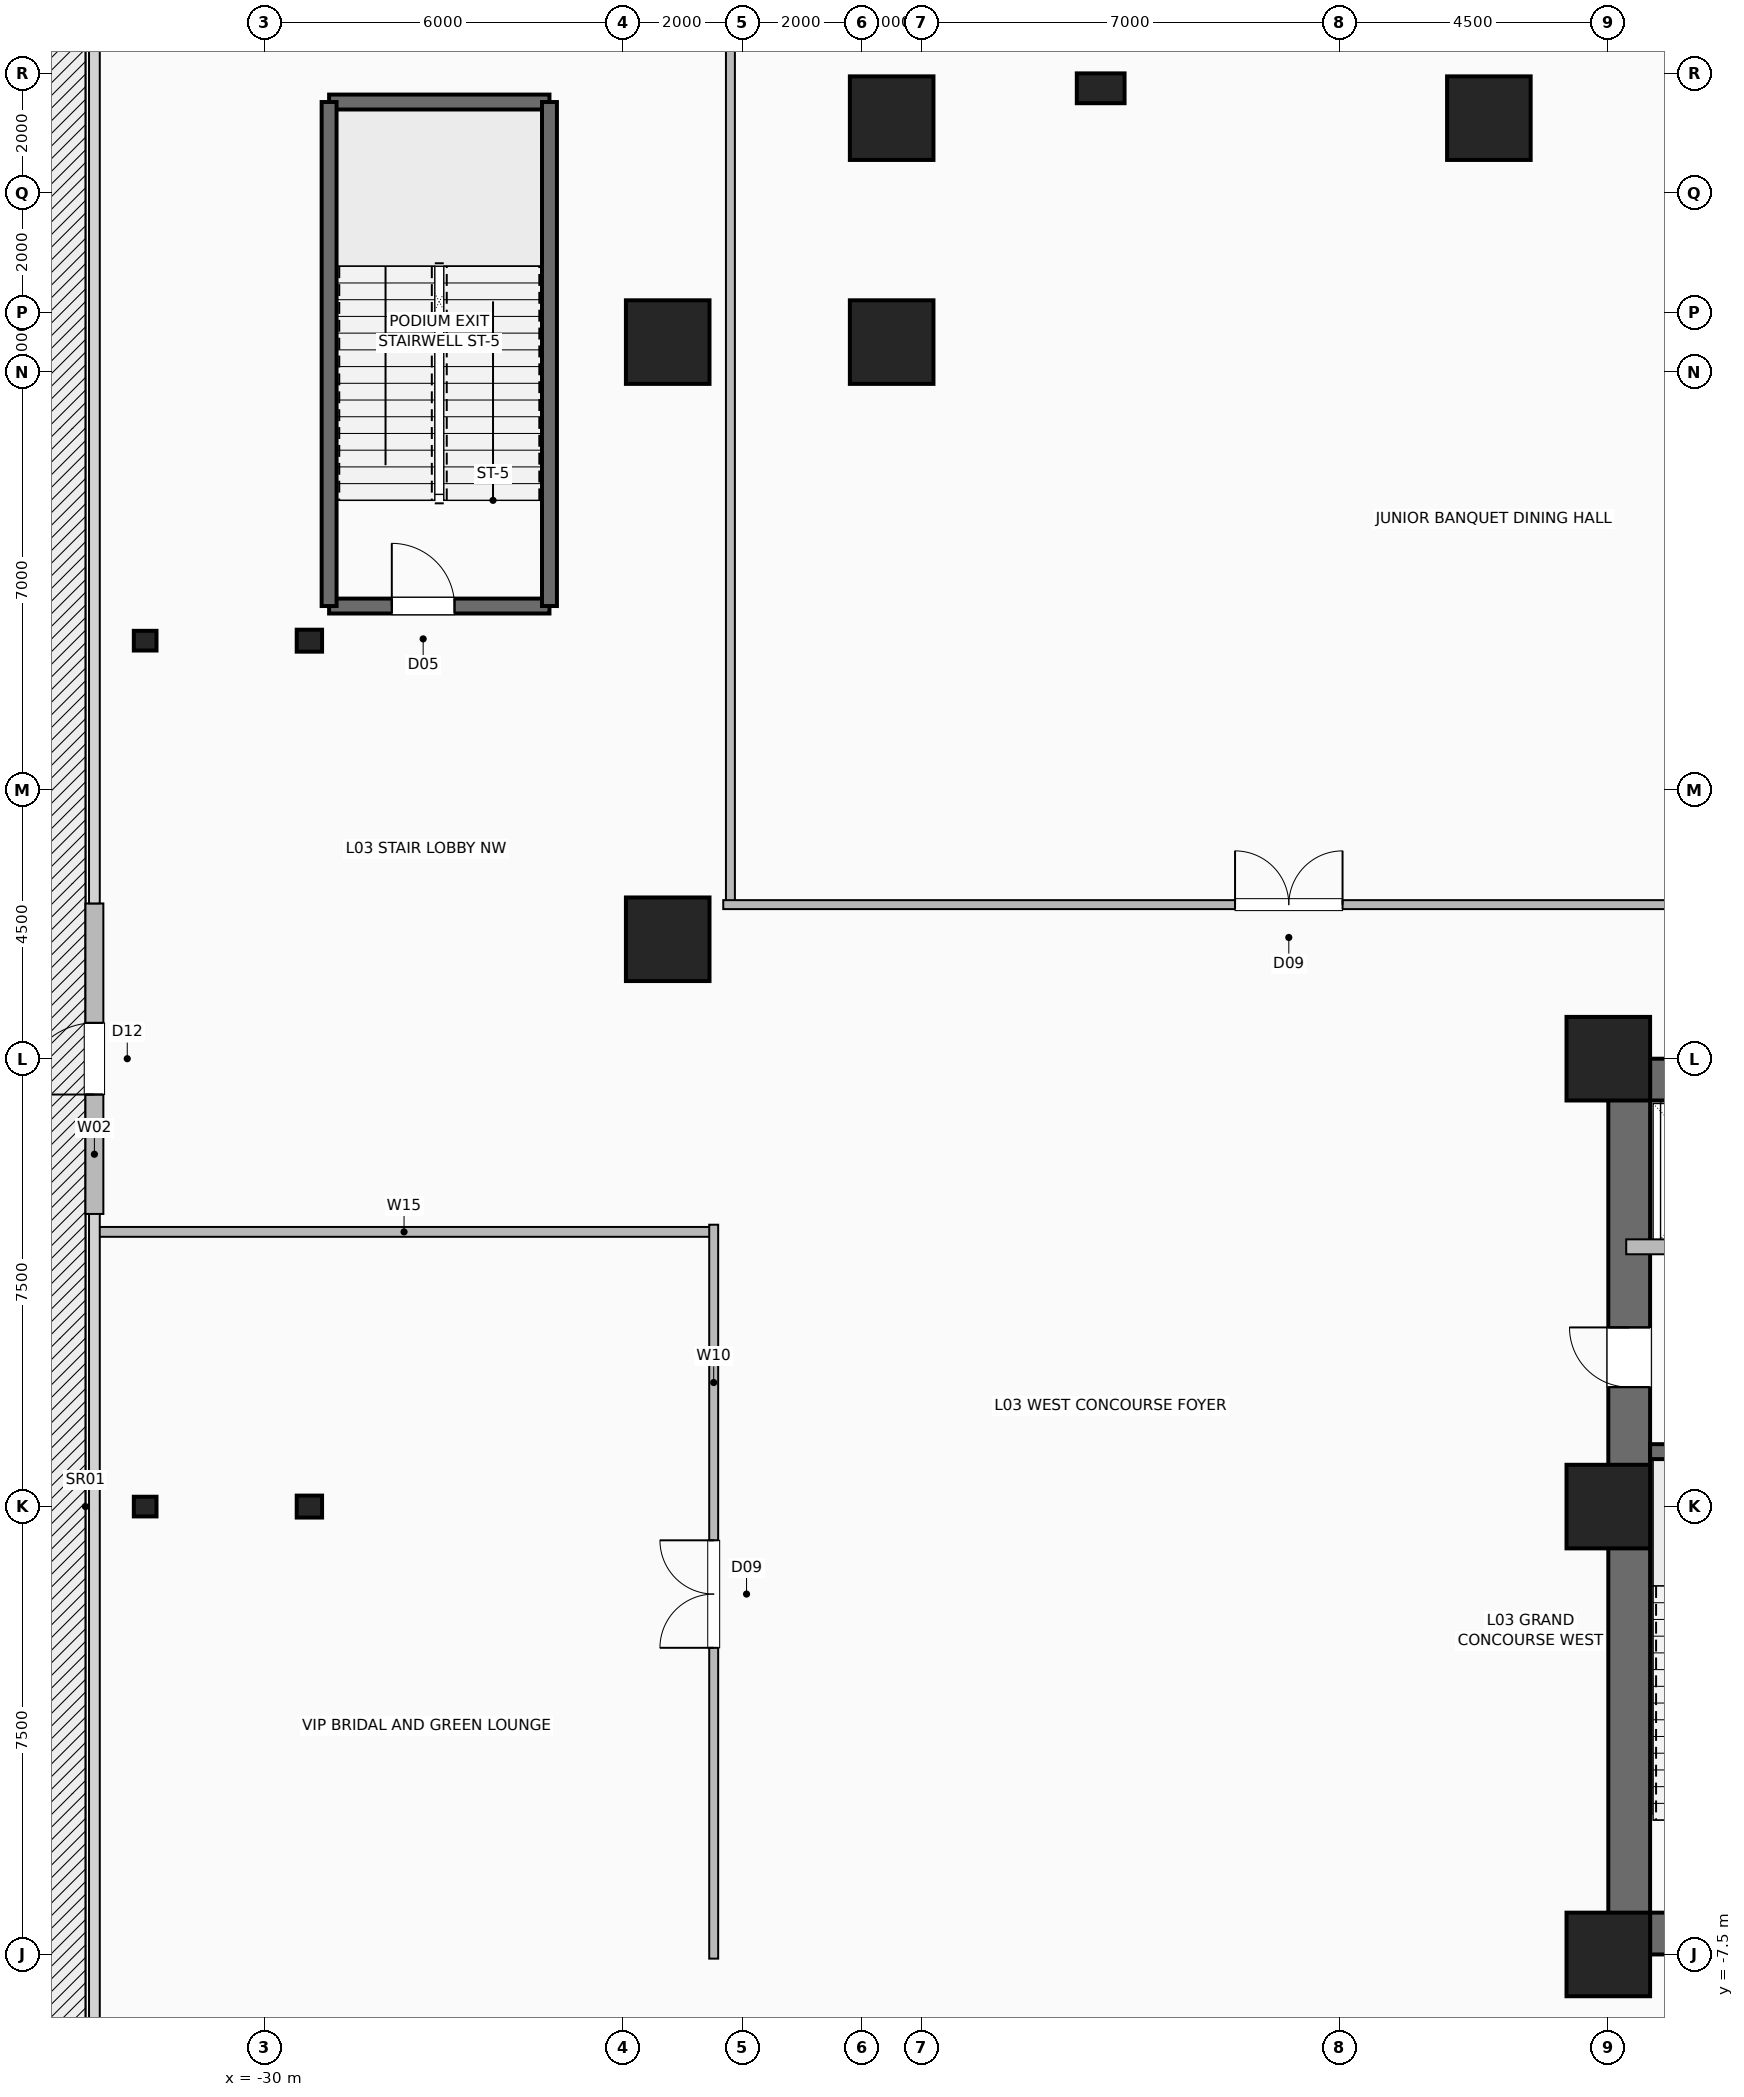
"""IFC4 building model, lengths in metres.
Left out: names, types, materials, properties, quantities, classifications, styles, units other than length and angle.
Written with IfcOpenShell. Run it as: python <this file> out.ifc"""

import sys

from ifc_helpers import new_model, si_unit, direction, frame, frame_2d, origin, origin_2d, place, context, subcontext, project, spatial, rectangle, hollow_rectangle, i_section, extrude, element, fill, save


model = new_model("IFC4")
c1 = context("Model", 3, precision=1e-05, world=origin(), true_north=direction((0.0, 1.0)))
c2 = subcontext(c1, "Body", "Model", "MODEL_VIEW")
j1 = project(units=[si_unit("LENGTHUNIT", "METRE"), si_unit("PLANEANGLEUNIT", "RADIAN")], contexts=[c1])
p1 = place(None, origin())
s1 = spatial("IfcSite", under=j1, at=p1, CompositionType="ELEMENT")
p2 = place(p1, origin())
s2 = spatial("IfcBuilding", under=s1, at=p2, CompositionType="ELEMENT")
p3 = place(p2, frame((0.0, 0.0, 16.2)))
s3 = spatial("IfcBuildingStorey", under=s2, at=p3, CompositionType="ELEMENT", Elevation=16.2)
for number, where, z_axis, x_axis in (
    (1, (-7.5, -7.5, 0.0), (0.0, 0.0, 1.0), (1.0, 0.0, 0.0)),
    (2, (-7.5, 7.5, 0.0), (0.0, 0.0, 1.0), (1.0, 0.0, 0.0)),
    (3, (-7.5, 0.0, 0.0), (0.0, 0.0, 1.0), (1.0, 0.0, 0.0)),
    (4, (-19.5, 23.25, 0.0), (0.0, 0.0, 1.0), (1.0, 0.0, 0.0)),
    (5, (-9.5, 23.25, 0.0), (0.0, 0.0, 1.0), (1.0, 0.0, 0.0)),
    (6, (-23.25, 9.5, 0.0), (0.0, 0.0, 1.0), (1.0, 0.0, 0.0)),
    (7, (-23.25, 19.5, 0.0), (0.0, 0.0, 1.0), (1.0, 0.0, 0.0)),
    (8, (-19.5, 19.5, 0.0), (0.0, 0.0, 1.0), (1.0, 0.0, 0.0)),
):
    element("IfcColumn", number, at=place(p3, frame(where, z_axis=z_axis, x_axis=x_axis)), inside=s3, PredefinedType="COLUMN", context=c2, shape_type="SweptSolid", body=[
        extrude(hollow_rectangle(XDim=1.4, YDim=1.4, WallThickness=0.06, at=origin_2d()), origin(), (0.0, 0.0, 1.0), 5.4),
    ])
for number, where, z_axis, x_axis in (
    (9, (-29.25, 0.0, 0.0), (0.0, 0.0, 1.0), (1.0, 0.0, 0.0)),
    (10, (-29.25, 14.5, 0.0), (0.0, 0.0, 1.0), (1.0, 0.0, 0.0)),
):
    element("IfcColumn", number, at=place(p3, frame(where, z_axis=z_axis, x_axis=x_axis)), inside=s3, PredefinedType="COLUMN", context=c2, shape_type="SweptSolid", body=[
        extrude(i_section(OverallWidth=0.368, OverallDepth=0.425, WebThickness=0.03, FlangeThickness=0.048, FilletRadius=0.02, at=origin_2d()), origin(), (0.0, 0.0, 1.0), 5.4),
    ])
for number, where, z_axis, x_axis in (
    (11, (-32.0, 0.0, -0.4), (0.0, 0.0, 1.0), (1.0, 0.0, 0.0)),
    (12, (-32.0, 14.5, -0.4), (0.0, 0.0, 1.0), (1.0, 0.0, 0.0)),
):
    element("IfcColumn", number, at=place(p3, frame(where, z_axis=z_axis, x_axis=x_axis)), inside=s3, PredefinedType="COLUMN", context=c2, shape_type="SweptSolid", body=[
        extrude(i_section(OverallWidth=0.33, OverallDepth=0.38, WebThickness=0.017, FlangeThickness=0.028, FilletRadius=0.02, at=origin_2d()), origin(), (0.0, 0.0, 1.0), 5.4),
    ])
p4 = place(p3, frame((-16.0, 23.75, 0.0), z_axis=(0.0, 0.0, 1.0), x_axis=(1.0, 0.0, 0.0)))
e13 = element("IfcColumn", 13, at=p4, inside=s3, PredefinedType="PILASTER", context=c2, shape_type="SweptSolid", body=[
    extrude(rectangle(XDim=0.5, YDim=0.8, at=origin_2d()), origin(), (0.0, 0.0, 1.0), 5.4),
])
p5 = place(p3, frame((-32.85, 4.9, 0.0), z_axis=(0.0, 0.0, 1.0), x_axis=(0.0, 1.0, 0.0)))
e14 = element("IfcWall", 14, at=p5, inside=s3, PredefinedType="SOLIDWALL", context=c2, shape_type="SweptSolid", body=[
    extrude(rectangle(XDim=5.2, YDim=0.3, at=frame_2d((2.6, 0.0))), origin(), (0.0, 0.0, 1.0), 5.0),
])
p6 = place(p5, frame((2.0, 0.0, 0.0)))
e15 = element("IfcOpeningElement", 15, at=p6, cuts=e14, PredefinedType="OPENING", context=c2, shape_type="SweptSolid", body=[
    extrude(rectangle(XDim=1.2, YDim=2.25, at=frame_2d((0.6, 1.125))), frame((0.0, 0.16, 0.0), z_axis=(0.0, -1.0, 0.0), x_axis=(1.0, 0.0, 0.0)), (0.0, 0.0, 1.0), 0.32),
])
p7 = place(p3, frame((-7.5, -7.15, 0.0), z_axis=(0.0, 0.0, 1.0), x_axis=(1.0, 0.0, 0.0)))
e16 = element("IfcWall", 16, at=p7, inside=s3, PredefinedType="SHEAR", context=c2, shape_type="SweptSolid", body=[
    extrude(rectangle(XDim=15.0, YDim=0.7, at=frame_2d((7.5, 0.0))), origin(), (0.0, 0.0, 1.0), 5.0),
])
p8 = place(p7, frame((1.55, 0.0, 0.0)))
e17 = element("IfcOpeningElement", 17, at=p8, cuts=e16, PredefinedType="OPENING", context=c2, shape_type="SweptSolid", body=[
    extrude(rectangle(XDim=1.05, YDim=2.08, at=frame_2d((0.525, 1.04))), frame((0.0, 0.36, 0.0), z_axis=(0.0, -1.0, 0.0), x_axis=(1.0, 0.0, 0.0)), (0.0, 0.0, 1.0), 0.72),
])
p9 = place(p7, frame((12.4, 0.0, 0.0)))
e18 = element("IfcOpeningElement", 18, at=p9, cuts=e16, PredefinedType="OPENING", context=c2, shape_type="SweptSolid", body=[
    extrude(rectangle(XDim=1.05, YDim=2.08, at=frame_2d((0.525, 1.04))), frame((0.0, 0.36, 0.0), z_axis=(0.0, -1.0, 0.0), x_axis=(1.0, 0.0, 0.0)), (0.0, 0.0, 1.0), 0.72),
])
p10 = place(p7, frame((4.64, 0.0, 0.0)))
e19 = element("IfcOpeningElement", 19, at=p10, cuts=e16, PredefinedType="OPENING", context=c2, shape_type="SweptSolid", body=[
    extrude(rectangle(XDim=1.1, YDim=2.2, at=frame_2d((0.55, 1.1))), frame((0.0, 0.36, 0.0), z_axis=(0.0, -1.0, 0.0), x_axis=(1.0, 0.0, 0.0)), (0.0, 0.0, 1.0), 0.72),
])
p11 = place(p7, frame((6.52, 0.0, 0.0)))
e20 = element("IfcOpeningElement", 20, at=p11, cuts=e16, PredefinedType="OPENING", context=c2, shape_type="SweptSolid", body=[
    extrude(rectangle(XDim=1.1, YDim=2.2, at=frame_2d((0.55, 1.1))), frame((0.0, 0.36, 0.0), z_axis=(0.0, -1.0, 0.0), x_axis=(1.0, 0.0, 0.0)), (0.0, 0.0, 1.0), 0.72),
])
p12 = place(p7, frame((8.4, 0.0, 0.0)))
e21 = element("IfcOpeningElement", 21, at=p12, cuts=e16, PredefinedType="OPENING", context=c2, shape_type="SweptSolid", body=[
    extrude(rectangle(XDim=1.1, YDim=2.2, at=frame_2d((0.55, 1.1))), frame((0.0, 0.36, 0.0), z_axis=(0.0, -1.0, 0.0), x_axis=(1.0, 0.0, 0.0)), (0.0, 0.0, 1.0), 0.72),
])
p13 = place(p3, frame((-7.5, 7.15, 0.0), z_axis=(0.0, 0.0, 1.0), x_axis=(1.0, 0.0, 0.0)))
e22 = element("IfcWall", 22, at=p13, inside=s3, PredefinedType="SHEAR", context=c2, shape_type="SweptSolid", body=[
    extrude(rectangle(XDim=15.0, YDim=0.7, at=frame_2d((7.5, 0.0))), origin(), (0.0, 0.0, 1.0), 5.0),
])
p14 = place(p3, frame((-7.15, -7.5, 0.0), z_axis=(0.0, 0.0, 1.0), x_axis=(0.0, 1.0, 0.0)))
e23 = element("IfcWall", 23, at=p14, inside=s3, PredefinedType="SHEAR", context=c2, shape_type="SweptSolid", body=[
    extrude(rectangle(XDim=15.0, YDim=0.7, at=frame_2d((7.5, 0.0))), origin(), (0.0, 0.0, 1.0), 5.0),
])
p15 = place(p14, frame((9.5, 0.0, 0.0)))
e24 = element("IfcOpeningElement", 24, at=p15, cuts=e23, PredefinedType="OPENING", context=c2, shape_type="SweptSolid", body=[
    extrude(rectangle(XDim=1.0, YDim=2.08, at=frame_2d((0.5, 1.04))), frame((0.0, 0.36, 0.0), z_axis=(0.0, -1.0, 0.0), x_axis=(1.0, 0.0, 0.0)), (0.0, 0.0, 1.0), 0.72),
])
p16 = place(p3, frame((-6.8, 0.92, 0.0), z_axis=(0.0, 0.0, 1.0), x_axis=(1.0, 0.0, 0.0)))
e25 = element("IfcWall", 25, at=p16, inside=s3, PredefinedType="SHEAR", context=c2, shape_type="SweptSolid", body=[
    extrude(rectangle(XDim=3.33, YDim=0.25, at=frame_2d((1.665, 0.0))), origin(), (0.0, 0.0, 1.0), 5.0),
])
p17 = place(p3, frame((-7.2, 4.35, 0.0), z_axis=(0.0, 0.0, 1.0), x_axis=(1.0, 0.0, 0.0)))
e26 = element("IfcWall", 26, at=p17, inside=s3, PredefinedType="SHEAR", context=c2, shape_type="SweptSolid", body=[
    extrude(rectangle(XDim=2.7, YDim=0.25, at=frame_2d((1.35, 0.0))), origin(), (0.0, 0.0, 1.0), 5.0),
])
p18 = place(p17, frame((0.75, 0.0, 0.0)))
e27 = element("IfcOpeningElement", 27, at=p18, cuts=e26, PredefinedType="OPENING", context=c2, shape_type="SweptSolid", body=[
    extrude(rectangle(XDim=1.2, YDim=2.2, at=frame_2d((0.6, 1.1))), frame((0.0, 0.135, 0.0), z_axis=(0.0, -1.0, 0.0), x_axis=(1.0, 0.0, 0.0)), (0.0, 0.0, 1.0), 0.27),
])
p19 = place(p3, frame((-28.92, 15.08, 0.0), z_axis=(0.0, 0.0, 1.0), x_axis=(1.0, 0.0, 0.0)))
e28 = element("IfcWall", 28, at=p19, inside=s3, PredefinedType="SHEAR", context=c2, shape_type="SweptSolid", body=[
    extrude(rectangle(XDim=3.69, YDim=0.25, at=frame_2d((1.845, 0.0))), origin(), (0.0, 0.0, 1.0), 5.0),
])
p20 = place(p19, frame((1.05, 0.0, 0.0)))
e29 = element("IfcOpeningElement", 29, at=p20, cuts=e28, PredefinedType="OPENING", context=c2, shape_type="SweptSolid", body=[
    extrude(rectangle(XDim=1.05, YDim=2.08, at=frame_2d((0.525, 1.04))), frame((0.0, 0.135, 0.0), z_axis=(0.0, -1.0, 0.0), x_axis=(1.0, 0.0, 0.0)), (0.0, 0.0, 1.0), 0.27),
])
p21 = place(p3, frame((-28.92, 23.52, 0.0), z_axis=(0.0, 0.0, 1.0), x_axis=(1.0, 0.0, 0.0)))
e30 = element("IfcWall", 30, at=p21, inside=s3, PredefinedType="SHEAR", context=c2, shape_type="SweptSolid", body=[
    extrude(rectangle(XDim=3.69, YDim=0.25, at=frame_2d((1.845, 0.0))), origin(), (0.0, 0.0, 1.0), 5.0),
])
for number, where, z_axis, x_axis in (
    (31, (-28.92, 15.08, 0.0), (0.0, 0.0, 1.0), (0.0, 1.0, 0.0)),
    (32, (-25.23, 15.08, 0.0), (0.0, 0.0, 1.0), (0.0, 1.0, 0.0)),
):
    element("IfcWall", number, at=place(p3, frame(where, z_axis=z_axis, x_axis=x_axis)), inside=s3, PredefinedType="SHEAR", context=c2, shape_type="SweptSolid", body=[
        extrude(rectangle(XDim=8.44, YDim=0.25, at=frame_2d((4.22, 0.0))), origin(), (0.0, 0.0, 1.0), 5.0),
    ])
p22 = place(p3, frame((-22.2, 10.08, 0.0), z_axis=(0.0, 0.0, 1.0), x_axis=(0.0, 1.0, 0.0)))
e33 = element("IfcWall", 33, at=p22, inside=s3, PredefinedType="PARTITIONING", context=c2, shape_type="SweptSolid", body=[
    extrude(rectangle(XDim=15.27, YDim=0.15, at=frame_2d((7.635, 0.0))), origin(), (0.0, 0.0, 1.0), 5.0),
])
p23 = place(p3, frame((-22.32, 10.08, 0.0), z_axis=(0.0, 0.0, 1.0), x_axis=(1.0, 0.0, 0.0)))
e34 = element("IfcWall", 34, at=p23, inside=s3, PredefinedType="PARTITIONING", context=c2, shape_type="SweptSolid", body=[
    extrude(rectangle(XDim=44.64, YDim=0.15, at=frame_2d((22.32, 0.0))), origin(), (0.0, 0.0, 1.0), 5.0),
])
p24 = place(p23, frame((8.57, 0.0, 0.0)))
e35 = element("IfcOpeningElement", 35, at=p24, cuts=e34, PredefinedType="OPENING", context=c2, shape_type="SweptSolid", body=[
    extrude(rectangle(XDim=1.8, YDim=2.08, at=frame_2d((0.9, 1.04))), frame((0.0, 0.085, 0.0), z_axis=(0.0, -1.0, 0.0), x_axis=(1.0, 0.0, 0.0)), (0.0, 0.0, 1.0), 0.17),
])
p25 = place(p23, frame((22.42, 0.0, 0.0)))
e36 = element("IfcOpeningElement", 36, at=p25, cuts=e34, PredefinedType="OPENING", context=c2, shape_type="SweptSolid", body=[
    extrude(rectangle(XDim=1.8, YDim=2.08, at=frame_2d((0.9, 1.04))), frame((0.0, 0.085, 0.0), z_axis=(0.0, -1.0, 0.0), x_axis=(1.0, 0.0, 0.0)), (0.0, 0.0, 1.0), 0.17),
])
p26 = place(p23, frame((35.27, 0.0, 0.0)))
e37 = element("IfcOpeningElement", 37, at=p26, cuts=e34, PredefinedType="OPENING", context=c2, shape_type="SweptSolid", body=[
    extrude(rectangle(XDim=1.8, YDim=2.08, at=frame_2d((0.9, 1.04))), frame((0.0, 0.085, 0.0), z_axis=(0.0, -1.0, 0.0), x_axis=(1.0, 0.0, 0.0)), (0.0, 0.0, 1.0), 0.17),
])
p27 = place(p3, frame((-32.85, 4.6, 0.0), z_axis=(0.0, 0.0, 1.0), x_axis=(1.0, 0.0, 0.0)))
e38 = element("IfcWall", 38, at=p27, inside=s3, PredefinedType="PLUMBINGWALL", context=c2, shape_type="SweptSolid", body=[
    extrude(rectangle(XDim=10.37, YDim=0.165, at=frame_2d((5.185, 0.0))), origin(), (0.0, 0.0, 1.0), 5.0),
])
p28 = place(p3, frame((-22.48, -7.57, 0.0), z_axis=(0.0, 0.0, 1.0), x_axis=(0.0, 1.0, 0.0)))
e39 = element("IfcWall", 39, at=p28, inside=s3, PredefinedType="PARTITIONING", context=c2, shape_type="SweptSolid", body=[
    extrude(rectangle(XDim=12.29, YDim=0.15, at=frame_2d((6.145, 0.0))), origin(), (0.0, 0.0, 1.0), 5.0),
])
p29 = place(p28, frame((5.205, 0.0, 0.0)))
e40 = element("IfcOpeningElement", 40, at=p29, cuts=e39, PredefinedType="OPENING", context=c2, shape_type="SweptSolid", body=[
    extrude(rectangle(XDim=1.8, YDim=2.08, at=frame_2d((0.9, 1.04))), frame((0.0, 0.085, 0.0), z_axis=(0.0, -1.0, 0.0), x_axis=(1.0, 0.0, 0.0)), (0.0, 0.0, 1.0), 0.17),
])
p30 = place(p6, origin())
e41 = element("IfcDoor", 41, at=p30, inside=s3, OperationType="SINGLE_SWING_LEFT", PredefinedType="DOOR", context=c2, shape_type="SweptSolid", body=[
    extrude(rectangle(XDim=1.2, YDim=2.25, at=frame_2d((0.6, 1.125))), frame((0.0, 0.025, 0.0), z_axis=(0.0, -1.0, 0.0), x_axis=(1.0, 0.0, 0.0)), (0.0, 0.0, 1.0), 0.05),
])
fill(e15, e41)
p31 = place(p15, origin())
e42 = element("IfcDoor", 42, at=p31, inside=s3, OperationType="SINGLE_SWING_RIGHT", PredefinedType="DOOR", context=c2, shape_type="SweptSolid", body=[
    extrude(rectangle(XDim=1.0, YDim=2.08, at=frame_2d((0.5, 1.04))), frame((0.0, 0.025, 0.0), z_axis=(0.0, -1.0, 0.0), x_axis=(1.0, 0.0, 0.0)), (0.0, 0.0, 1.0), 0.05),
])
fill(e24, e42)
p32 = place(p20, origin())
e43 = element("IfcDoor", 43, at=p32, inside=s3, OperationType="SINGLE_SWING_LEFT", PredefinedType="DOOR", context=c2, shape_type="SweptSolid", body=[
    extrude(rectangle(XDim=1.05, YDim=2.08, at=frame_2d((0.525, 1.04))), frame((0.0, 0.025, 0.0), z_axis=(0.0, -1.0, 0.0), x_axis=(1.0, 0.0, 0.0)), (0.0, 0.0, 1.0), 0.05),
])
fill(e29, e43)
p33 = place(p24, origin())
e44 = element("IfcDoor", 44, at=p33, inside=s3, OperationType="DOUBLE_DOOR_SINGLE_SWING", PredefinedType="DOOR", context=c2, shape_type="SweptSolid", body=[
    extrude(rectangle(XDim=1.8, YDim=2.08, at=frame_2d((0.9, 1.04))), frame((0.0, 0.025, 0.0), z_axis=(0.0, -1.0, 0.0), x_axis=(1.0, 0.0, 0.0)), (0.0, 0.0, 1.0), 0.05),
])
fill(e35, e44)
p34 = place(p29, origin())
e45 = element("IfcDoor", 45, at=p34, inside=s3, OperationType="DOUBLE_DOOR_SINGLE_SWING", PredefinedType="DOOR", context=c2, shape_type="SweptSolid", body=[
    extrude(rectangle(XDim=1.8, YDim=2.08, at=frame_2d((0.9, 1.04))), frame((0.0, 0.025, 0.0), z_axis=(0.0, -1.0, 0.0), x_axis=(1.0, 0.0, 0.0)), (0.0, 0.0, 1.0), 0.05),
])
fill(e40, e45)
save(model, sys.argv[1])
